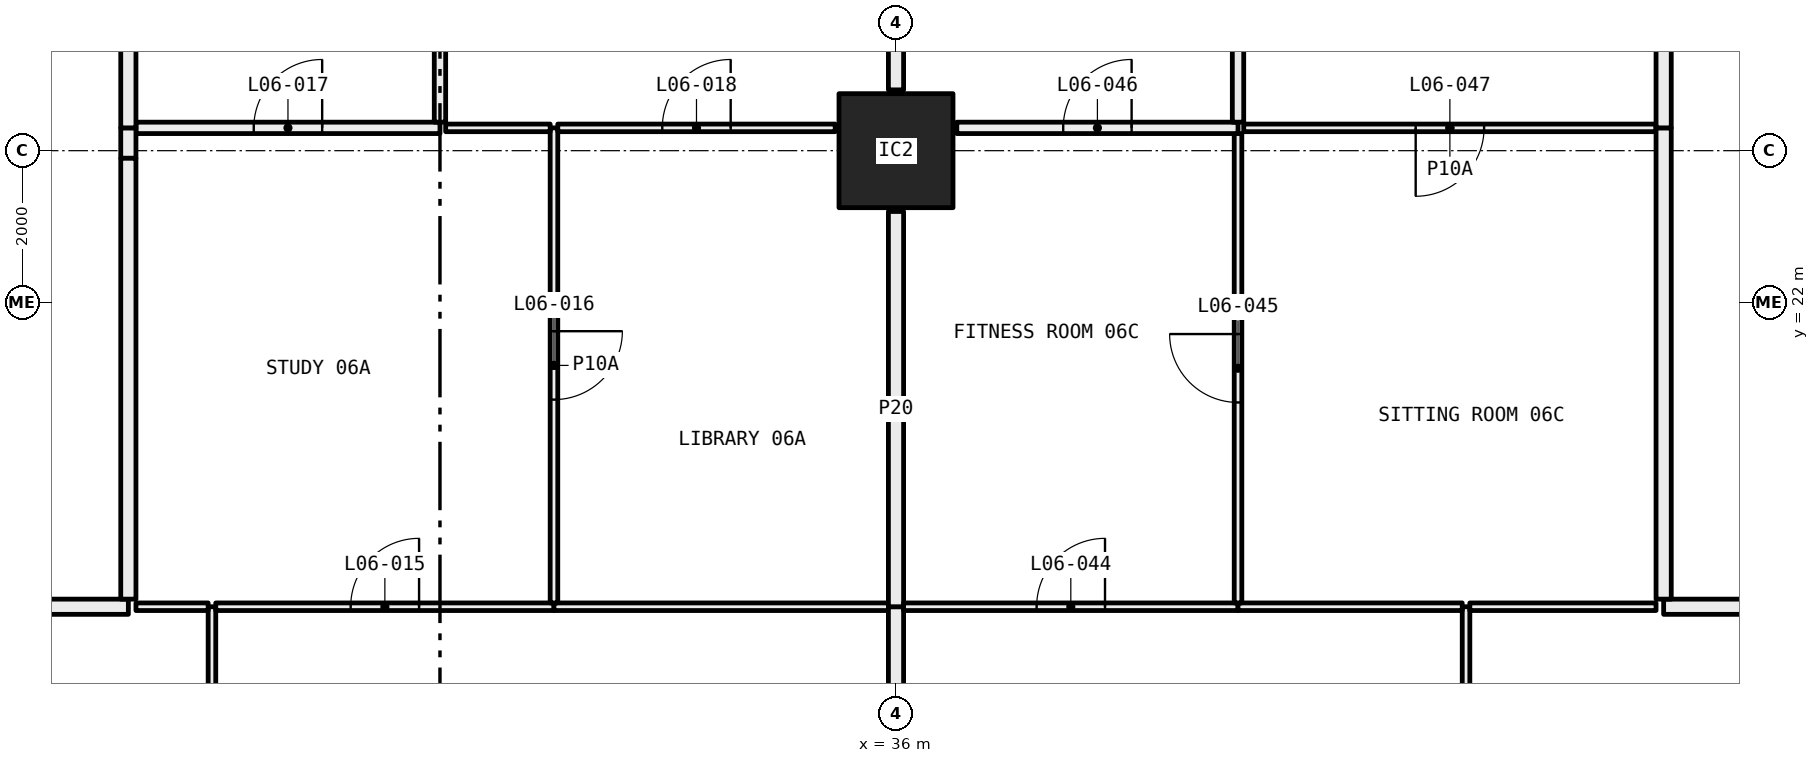
"""IFC4 building model, lengths in metres.
Left out: names, types, materials, properties, quantities, classifications, styles, units other than length and angle.
Written with IfcOpenShell. Run it as: python <this file> out.ifc"""

import sys

from ifc_helpers import new_model, si_unit, direction, frame, frame_2d, origin, origin_2d, place, context, subcontext, project, spatial, rectangle, hollow_rectangle, extrude, element, fill, save


model = new_model("IFC4")
c1 = context("Model", 3, precision=1e-05, world=origin(), true_north=direction((0.0, 1.0)))
c2 = subcontext(c1, "Body", "Model", "MODEL_VIEW")
j1 = project(units=[si_unit("LENGTHUNIT", "METRE"), si_unit("PLANEANGLEUNIT", "RADIAN")], contexts=[c1])
p1 = place(None, origin())
s1 = spatial("IfcSite", under=j1, at=p1, CompositionType="ELEMENT")
p2 = place(p1, origin())
s2 = spatial("IfcBuilding", under=s1, at=p2, CompositionType="ELEMENT")
p3 = place(p2, frame((0.0, 0.0, 33.45)))
s3 = spatial("IfcBuildingStorey", under=s2, at=p3, CompositionType="ELEMENT", Elevation=33.45)
p4 = place(p3, frame((36.0, 24.0, 0.0), z_axis=(0.0, 0.0, 1.0), x_axis=(1.0, 0.0, 0.0)))
e1 = element("IfcColumn", 1, at=p4, inside=s3, PredefinedType="COLUMN", context=c2, shape_type="SweptSolid", body=[
    extrude(hollow_rectangle(XDim=1.5, YDim=1.5, WallThickness=0.065, at=origin_2d()), origin(), (0.0, 0.0, 1.0), 3.05),
])
p5 = place(p3, frame((27.0, 12.05, 0.0), z_axis=(0.0, 0.0, 1.0), x_axis=(0.0, 1.0, 0.0)))
e2 = element("IfcWall", 2, at=p5, inside=s3, PredefinedType="PARTITIONING", context=c2, shape_type="SweptSolid", body=[
    extrude(rectangle(XDim=5.95, YDim=0.1, at=frame_2d((2.975, 0.0))), origin(), (0.0, 0.0, 1.0), 2.45),
])
p6 = place(p3, frame((26.95, 18.0, 0.0), z_axis=(0.0, 0.0, 1.0), x_axis=(-1.0, 0.0, 0.0)))
e3 = element("IfcWall", 3, at=p6, inside=s3, PredefinedType="PARTITIONING", context=c2, shape_type="SweptSolid", body=[
    extrude(rectangle(XDim=0.95, YDim=0.1, at=frame_2d((0.475, 0.0))), origin(), (0.0, 0.0, 1.0), 3.05),
])
p7 = place(p3, frame((25.9, 18.0, 0.0), z_axis=(0.0, 0.0, 1.0), x_axis=(-1.0, 0.0, 0.0)))
e4 = element("IfcWall", 4, at=p7, inside=s3, PredefinedType="PARTITIONING", context=c2, shape_type="SweptSolid", body=[
    extrude(rectangle(XDim=7.9, YDim=0.2, at=frame_2d((3.95, 0.0))), origin(), (0.0, 0.0, 1.0), 3.05),
])
p8 = place(p3, frame((31.5, 18.0, 0.0), z_axis=(0.0, 0.0, 1.0), x_axis=(-1.0, 0.0, 0.0)))
e5 = element("IfcWall", 5, at=p8, inside=s3, PredefinedType="PARTITIONING", context=c2, shape_type="SweptSolid", body=[
    extrude(rectangle(XDim=4.45, YDim=0.1, at=frame_2d((2.225, 0.0))), origin(), (0.0, 0.0, 1.0), 3.05),
])
p9 = place(p8, frame((1.775, 0.0, 0.0)))
e6 = element("IfcOpeningElement", 6, at=p9, cuts=e5, PredefinedType="OPENING", context=c2, shape_type="SweptSolid", body=[
    extrude(rectangle(XDim=0.9, YDim=2.1, at=frame_2d((0.45, 1.05))), frame((0.0, 0.06, 0.0), z_axis=(0.0, -1.0, 0.0), x_axis=(1.0, 0.0, 0.0)), (0.0, 0.0, 1.0), 0.12),
])
p10 = place(p3, frame((35.9, 18.0, 0.0), z_axis=(0.0, 0.0, 1.0), x_axis=(-1.0, 0.0, 0.0)))
e7 = element("IfcWall", 7, at=p10, inside=s3, PredefinedType="PARTITIONING", context=c2, shape_type="SweptSolid", body=[
    extrude(rectangle(XDim=4.4, YDim=0.1, at=frame_2d((2.2, 0.0))), origin(), (0.0, 0.0, 1.0), 3.05),
])
p11 = place(p3, frame((36.0, 12.8, 0.0), z_axis=(0.0, 0.0, 1.0), x_axis=(0.0, 1.0, 0.0)))
e8 = element("IfcWall", 8, at=p11, inside=s3, PredefinedType="PARTITIONING", context=c2, shape_type="SweptSolid", body=[
    extrude(rectangle(XDim=5.2, YDim=0.2, at=frame_2d((2.6, 0.0))), origin(), (0.0, 0.0, 1.0), 2.45),
])
p12 = place(p3, frame((31.5, 18.05, 0.0), z_axis=(0.0, 0.0, 1.0), x_axis=(0.0, 1.0, 0.0)))
e9 = element("IfcWall", 9, at=p12, inside=s3, PredefinedType="PARTITIONING", context=c2, shape_type="SweptSolid", body=[
    extrude(rectangle(XDim=6.25, YDim=0.1, at=frame_2d((3.125, 0.0))), origin(), (0.0, 0.0, 1.0), 2.45),
])
p13 = place(p12, frame((2.675, 0.0, 0.0)))
e10 = element("IfcOpeningElement", 10, at=p13, cuts=e9, PredefinedType="OPENING", context=c2, shape_type="SweptSolid", body=[
    extrude(rectangle(XDim=0.9, YDim=2.1, at=frame_2d((0.45, 1.05))), frame((0.0, 0.06, 0.0), z_axis=(0.0, -1.0, 0.0), x_axis=(1.0, 0.0, 0.0)), (0.0, 0.0, 1.0), 0.12),
])
p14 = place(p3, frame((30.0, 24.3, 0.0), z_axis=(0.0, 0.0, 1.0), x_axis=(-1.0, 0.0, 0.0)))
e11 = element("IfcWall", 11, at=p14, inside=s3, PredefinedType="PARTITIONING", context=c2, shape_type="SweptSolid", body=[
    extrude(rectangle(XDim=4.0, YDim=0.15, at=frame_2d((2.0, 0.0))), origin(), (0.0, 0.0, 1.0), 3.05),
])
p15 = place(p14, frame((1.55, 0.0, 0.0)))
e12 = element("IfcOpeningElement", 12, at=p15, cuts=e11, PredefinedType="OPENING", context=c2, shape_type="SweptSolid", body=[
    extrude(rectangle(XDim=0.9, YDim=2.1, at=frame_2d((0.45, 1.05))), frame((0.0, 0.085, 0.0), z_axis=(0.0, -1.0, 0.0), x_axis=(1.0, 0.0, 0.0)), (0.0, 0.0, 1.0), 0.17),
])
p16 = place(p3, frame((31.45, 24.3, 0.0), z_axis=(0.0, 0.0, 1.0), x_axis=(-1.0, 0.0, 0.0)))
e13 = element("IfcWall", 13, at=p16, inside=s3, PredefinedType="PARTITIONING", context=c2, shape_type="SweptSolid", body=[
    extrude(rectangle(XDim=1.375, YDim=0.1, at=frame_2d((0.688, 0.0))), origin(), (0.0, 0.0, 1.0), 3.05),
])
p17 = place(p3, frame((25.9, 24.3, 0.0), z_axis=(0.0, 0.0, 1.0), x_axis=(0.0, -1.0, 0.0)))
e14 = element("IfcWall", 14, at=p17, inside=s3, PredefinedType="PARTITIONING", context=c2, shape_type="SweptSolid", body=[
    extrude(rectangle(XDim=0.4, YDim=0.2, at=frame_2d((0.2, 0.0))), origin(), (0.0, 0.0, 1.0), 2.45),
])
p18 = place(p3, frame((25.9, 23.9, 0.0), z_axis=(0.0, 0.0, 1.0), x_axis=(0.0, -1.0, 0.0)))
e15 = element("IfcWall", 15, at=p18, inside=s3, PredefinedType="PARTITIONING", context=c2, shape_type="SweptSolid", body=[
    extrude(rectangle(XDim=5.8, YDim=0.2, at=frame_2d((2.9, 0.0))), origin(), (0.0, 0.0, 1.0), 3.05),
])
p19 = place(p3, frame((35.2, 24.3, 0.0), z_axis=(0.0, 0.0, 1.0), x_axis=(-1.0, 0.0, 0.0)))
e16 = element("IfcWall", 16, at=p19, inside=s3, PredefinedType="PARTITIONING", context=c2, shape_type="SweptSolid", body=[
    extrude(rectangle(XDim=3.65, YDim=0.1, at=frame_2d((1.825, 0.0))), origin(), (0.0, 0.0, 1.0), 3.05),
])
p20 = place(p19, frame((1.375, 0.0, 0.0)))
e17 = element("IfcOpeningElement", 17, at=p20, cuts=e16, PredefinedType="OPENING", context=c2, shape_type="SweptSolid", body=[
    extrude(rectangle(XDim=0.9, YDim=2.1, at=frame_2d((0.45, 1.05))), frame((0.0, 0.06, 0.0), z_axis=(0.0, -1.0, 0.0), x_axis=(1.0, 0.0, 0.0)), (0.0, 0.0, 1.0), 0.12),
])
p21 = place(p3, frame((36.0, 18.0, 0.0), z_axis=(0.0, 0.0, 1.0), x_axis=(0.0, 1.0, 0.0)))
e18 = element("IfcWall", 18, at=p21, inside=s3, PredefinedType="PARTITIONING", context=c2, shape_type="SweptSolid", body=[
    extrude(rectangle(XDim=5.2, YDim=0.2, at=frame_2d((2.6, 0.0))), origin(), (0.0, 0.0, 1.0), 2.45),
])
p22 = place(p3, frame((30.0, 24.375, 0.0), z_axis=(0.0, 0.0, 1.0), x_axis=(0.0, 1.0, 0.0)))
e19 = element("IfcWall", 19, at=p22, inside=s3, PredefinedType="PARTITIONING", context=c2, shape_type="SweptSolid", body=[
    extrude(rectangle(XDim=4.325, YDim=0.15, at=frame_2d((2.163, 0.0))), origin(), (0.0, 0.0, 1.0), 3.05),
])
p23 = place(p3, frame((25.9, 28.7, 0.0), z_axis=(0.0, 0.0, 1.0), x_axis=(0.0, -1.0, 0.0)))
e20 = element("IfcWall", 20, at=p23, inside=s3, PredefinedType="PARTITIONING", context=c2, shape_type="SweptSolid", body=[
    extrude(rectangle(XDim=4.4, YDim=0.2, at=frame_2d((2.2, 0.0))), origin(), (0.0, 0.0, 1.0), 3.05),
])
p24 = place(p3, frame((36.0, 24.8, 0.0), z_axis=(0.0, 0.0, 1.0), x_axis=(0.0, 1.0, 0.0)))
e21 = element("IfcWall", 21, at=p24, inside=s3, PredefinedType="PARTITIONING", context=c2, shape_type="SweptSolid", body=[
    extrude(rectangle(XDim=4.0, YDim=0.2, at=frame_2d((2.0, 0.0))), origin(), (0.0, 0.0, 1.0), 2.45),
])
p25 = place(p3, frame((43.5, 12.05, 0.0), z_axis=(0.0, 0.0, 1.0), x_axis=(0.0, 1.0, 0.0)))
e22 = element("IfcWall", 22, at=p25, inside=s3, PredefinedType="PARTITIONING", context=c2, shape_type="SweptSolid", body=[
    extrude(rectangle(XDim=5.95, YDim=0.1, at=frame_2d((2.975, 0.0))), origin(), (0.0, 0.0, 1.0), 2.45),
])
p26 = place(p3, frame((40.5, 18.0, 0.0), z_axis=(0.0, 0.0, 1.0), x_axis=(-1.0, 0.0, 0.0)))
e23 = element("IfcWall", 23, at=p26, inside=s3, PredefinedType="PARTITIONING", context=c2, shape_type="SweptSolid", body=[
    extrude(rectangle(XDim=4.4, YDim=0.1, at=frame_2d((2.2, 0.0))), origin(), (0.0, 0.0, 1.0), 3.05),
])
p27 = place(p26, frame((1.75, 0.0, 0.0)))
e24 = element("IfcOpeningElement", 24, at=p27, cuts=e23, PredefinedType="OPENING", context=c2, shape_type="SweptSolid", body=[
    extrude(rectangle(XDim=0.9, YDim=2.1, at=frame_2d((0.45, 1.05))), frame((0.0, 0.06, 0.0), z_axis=(0.0, -1.0, 0.0), x_axis=(1.0, 0.0, 0.0)), (0.0, 0.0, 1.0), 0.12),
])
p28 = place(p3, frame((43.45, 18.0, 0.0), z_axis=(0.0, 0.0, 1.0), x_axis=(-1.0, 0.0, 0.0)))
e25 = element("IfcWall", 25, at=p28, inside=s3, PredefinedType="PARTITIONING", context=c2, shape_type="SweptSolid", body=[
    extrude(rectangle(XDim=2.95, YDim=0.1, at=frame_2d((1.475, 0.0))), origin(), (0.0, 0.0, 1.0), 3.05),
])
p29 = place(p3, frame((46.0, 18.0, 0.0), z_axis=(0.0, 0.0, 1.0), x_axis=(-1.0, 0.0, 0.0)))
e26 = element("IfcWall", 26, at=p29, inside=s3, PredefinedType="PARTITIONING", context=c2, shape_type="SweptSolid", body=[
    extrude(rectangle(XDim=2.45, YDim=0.1, at=frame_2d((1.225, 0.0))), origin(), (0.0, 0.0, 1.0), 3.05),
])
p30 = place(p3, frame((51.0, 18.0, 0.0), z_axis=(0.0, 0.0, 1.0), x_axis=(-1.0, 0.0, 0.0)))
e27 = element("IfcWall", 27, at=p30, inside=s3, PredefinedType="PARTITIONING", context=c2, shape_type="SweptSolid", body=[
    extrude(rectangle(XDim=4.9, YDim=0.2, at=frame_2d((2.45, 0.0))), origin(), (0.0, 0.0, 1.0), 3.05),
])
p31 = place(p3, frame((40.5, 18.05, 0.0), z_axis=(0.0, 0.0, 1.0), x_axis=(0.0, 1.0, 0.0)))
e28 = element("IfcWall", 28, at=p31, inside=s3, PredefinedType="PARTITIONING", context=c2, shape_type="SweptSolid", body=[
    extrude(rectangle(XDim=6.175, YDim=0.1, at=frame_2d((3.087, 0.0))), origin(), (0.0, 0.0, 1.0), 2.45),
])
p32 = place(p31, frame((2.637, 0.0, 0.0)))
e29 = element("IfcOpeningElement", 29, at=p32, cuts=e28, PredefinedType="OPENING", context=c2, shape_type="SweptSolid", body=[
    extrude(rectangle(XDim=0.9, YDim=2.1, at=frame_2d((0.45, 1.05))), frame((0.0, 0.06, 0.0), z_axis=(0.0, -1.0, 0.0), x_axis=(1.0, 0.0, 0.0)), (0.0, 0.0, 1.0), 0.12),
])
p33 = place(p3, frame((40.5, 24.3, 0.0), z_axis=(0.0, 0.0, 1.0), x_axis=(-1.0, 0.0, 0.0)))
e30 = element("IfcWall", 30, at=p33, inside=s3, PredefinedType="PARTITIONING", context=c2, shape_type="SweptSolid", body=[
    extrude(rectangle(XDim=3.7, YDim=0.15, at=frame_2d((1.85, 0.0))), origin(), (0.0, 0.0, 1.0), 3.05),
])
p34 = place(p33, frame((1.4, 0.0, 0.0)))
e31 = element("IfcOpeningElement", 31, at=p34, cuts=e30, PredefinedType="OPENING", context=c2, shape_type="SweptSolid", body=[
    extrude(rectangle(XDim=0.9, YDim=2.1, at=frame_2d((0.45, 1.05))), frame((0.0, 0.085, 0.0), z_axis=(0.0, -1.0, 0.0), x_axis=(1.0, 0.0, 0.0)), (0.0, 0.0, 1.0), 0.17),
])
p35 = place(p3, frame((46.0, 24.3, 0.0), z_axis=(0.0, 0.0, 1.0), x_axis=(-1.0, 0.0, 0.0)))
e32 = element("IfcWall", 32, at=p35, inside=s3, PredefinedType="PARTITIONING", context=c2, shape_type="SweptSolid", body=[
    extrude(rectangle(XDim=5.425, YDim=0.1, at=frame_2d((2.712, 0.0))), origin(), (0.0, 0.0, 1.0), 3.05),
])
p36 = place(p35, frame((2.262, 0.0, 0.0)))
e33 = element("IfcOpeningElement", 33, at=p36, cuts=e32, PredefinedType="OPENING", context=c2, shape_type="SweptSolid", body=[
    extrude(rectangle(XDim=0.9, YDim=2.1, at=frame_2d((0.45, 1.05))), frame((0.0, 0.06, 0.0), z_axis=(0.0, -1.0, 0.0), x_axis=(1.0, 0.0, 0.0)), (0.0, 0.0, 1.0), 0.12),
])
p37 = place(p3, frame((46.1, 18.1, 0.0), z_axis=(0.0, 0.0, 1.0), x_axis=(0.0, 1.0, 0.0)))
e34 = element("IfcWall", 34, at=p37, inside=s3, PredefinedType="PARTITIONING", context=c2, shape_type="SweptSolid", body=[
    extrude(rectangle(XDim=6.2, YDim=0.2, at=frame_2d((3.1, 0.0))), origin(), (0.0, 0.0, 1.0), 2.45),
])
p38 = place(p3, frame((40.5, 24.375, 0.0), z_axis=(0.0, 0.0, 1.0), x_axis=(0.0, 1.0, 0.0)))
e35 = element("IfcWall", 35, at=p38, inside=s3, PredefinedType="PARTITIONING", context=c2, shape_type="SweptSolid", body=[
    extrude(rectangle(XDim=4.325, YDim=0.15, at=frame_2d((2.163, 0.0))), origin(), (0.0, 0.0, 1.0), 3.05),
])
p39 = place(p3, frame((46.1, 24.3, 0.0), z_axis=(0.0, 0.0, 1.0), x_axis=(0.0, 1.0, 0.0)))
e36 = element("IfcWall", 36, at=p39, inside=s3, PredefinedType="PARTITIONING", context=c2, shape_type="SweptSolid", body=[
    extrude(rectangle(XDim=4.5, YDim=0.2, at=frame_2d((2.25, 0.0))), origin(), (0.0, 0.0, 1.0), 3.05),
])
p40 = place(p9, frame((0.9, 0.0, 0.0), x_axis=(-1.0, 0.0, 0.0)))
e37 = element("IfcDoor", 37, at=p40, inside=s3, OperationType="SINGLE_SWING_LEFT", PredefinedType="DOOR", context=c2, shape_type="SweptSolid", body=[
    extrude(rectangle(XDim=0.9, YDim=2.1, at=frame_2d((0.45, 1.05))), frame((0.0, 0.025, 0.0), z_axis=(0.0, -1.0, 0.0), x_axis=(1.0, 0.0, 0.0)), (0.0, 0.0, 1.0), 0.05),
])
fill(e6, e37)
p41 = place(p13, frame((0.9, 0.0, 0.0), x_axis=(-1.0, 0.0, 0.0)))
e38 = element("IfcDoor", 38, at=p41, inside=s3, OperationType="SINGLE_SWING_RIGHT", PredefinedType="DOOR", context=c2, shape_type="SweptSolid", body=[
    extrude(rectangle(XDim=0.9, YDim=2.1, at=frame_2d((0.45, 1.05))), frame((0.0, 0.025, 0.0), z_axis=(0.0, -1.0, 0.0), x_axis=(1.0, 0.0, 0.0)), (0.0, 0.0, 1.0), 0.05),
])
fill(e10, e38)
p42 = place(p15, frame((0.9, 0.0, 0.0), x_axis=(-1.0, 0.0, 0.0)))
e39 = element("IfcDoor", 39, at=p42, inside=s3, OperationType="SINGLE_SWING_LEFT", PredefinedType="DOOR", context=c2, shape_type="SweptSolid", body=[
    extrude(rectangle(XDim=0.9, YDim=2.1, at=frame_2d((0.45, 1.05))), frame((0.0, 0.025, 0.0), z_axis=(0.0, -1.0, 0.0), x_axis=(1.0, 0.0, 0.0)), (0.0, 0.0, 1.0), 0.05),
])
fill(e12, e39)
p43 = place(p20, frame((0.9, 0.0, 0.0), x_axis=(-1.0, 0.0, 0.0)))
e40 = element("IfcDoor", 40, at=p43, inside=s3, OperationType="SINGLE_SWING_LEFT", PredefinedType="DOOR", context=c2, shape_type="SweptSolid", body=[
    extrude(rectangle(XDim=0.9, YDim=2.1, at=frame_2d((0.45, 1.05))), frame((0.0, 0.025, 0.0), z_axis=(0.0, -1.0, 0.0), x_axis=(1.0, 0.0, 0.0)), (0.0, 0.0, 1.0), 0.05),
])
fill(e17, e40)
p44 = place(p27, frame((0.9, 0.0, 0.0), x_axis=(-1.0, 0.0, 0.0)))
e41 = element("IfcDoor", 41, at=p44, inside=s3, OperationType="SINGLE_SWING_LEFT", PredefinedType="DOOR", context=c2, shape_type="SweptSolid", body=[
    extrude(rectangle(XDim=0.9, YDim=2.1, at=frame_2d((0.45, 1.05))), frame((0.0, 0.025, 0.0), z_axis=(0.0, -1.0, 0.0), x_axis=(1.0, 0.0, 0.0)), (0.0, 0.0, 1.0), 0.05),
])
fill(e24, e41)
p45 = place(p32, origin())
e42 = element("IfcDoor", 42, at=p45, inside=s3, OperationType="SINGLE_SWING_LEFT", PredefinedType="DOOR", context=c2, shape_type="SweptSolid", body=[
    extrude(rectangle(XDim=0.9, YDim=2.1, at=frame_2d((0.45, 1.05))), frame((0.0, 0.025, 0.0), z_axis=(0.0, -1.0, 0.0), x_axis=(1.0, 0.0, 0.0)), (0.0, 0.0, 1.0), 0.05),
])
fill(e29, e42)
p46 = place(p34, frame((0.9, 0.0, 0.0), x_axis=(-1.0, 0.0, 0.0)))
e43 = element("IfcDoor", 43, at=p46, inside=s3, OperationType="SINGLE_SWING_LEFT", PredefinedType="DOOR", context=c2, shape_type="SweptSolid", body=[
    extrude(rectangle(XDim=0.9, YDim=2.1, at=frame_2d((0.45, 1.05))), frame((0.0, 0.025, 0.0), z_axis=(0.0, -1.0, 0.0), x_axis=(1.0, 0.0, 0.0)), (0.0, 0.0, 1.0), 0.05),
])
fill(e31, e43)
p47 = place(p36, origin())
e44 = element("IfcDoor", 44, at=p47, inside=s3, OperationType="SINGLE_SWING_LEFT", PredefinedType="DOOR", context=c2, shape_type="SweptSolid", body=[
    extrude(rectangle(XDim=0.9, YDim=2.1, at=frame_2d((0.45, 1.05))), frame((0.0, 0.025, 0.0), z_axis=(0.0, -1.0, 0.0), x_axis=(1.0, 0.0, 0.0)), (0.0, 0.0, 1.0), 0.05),
])
fill(e33, e44)
save(model, sys.argv[1])
